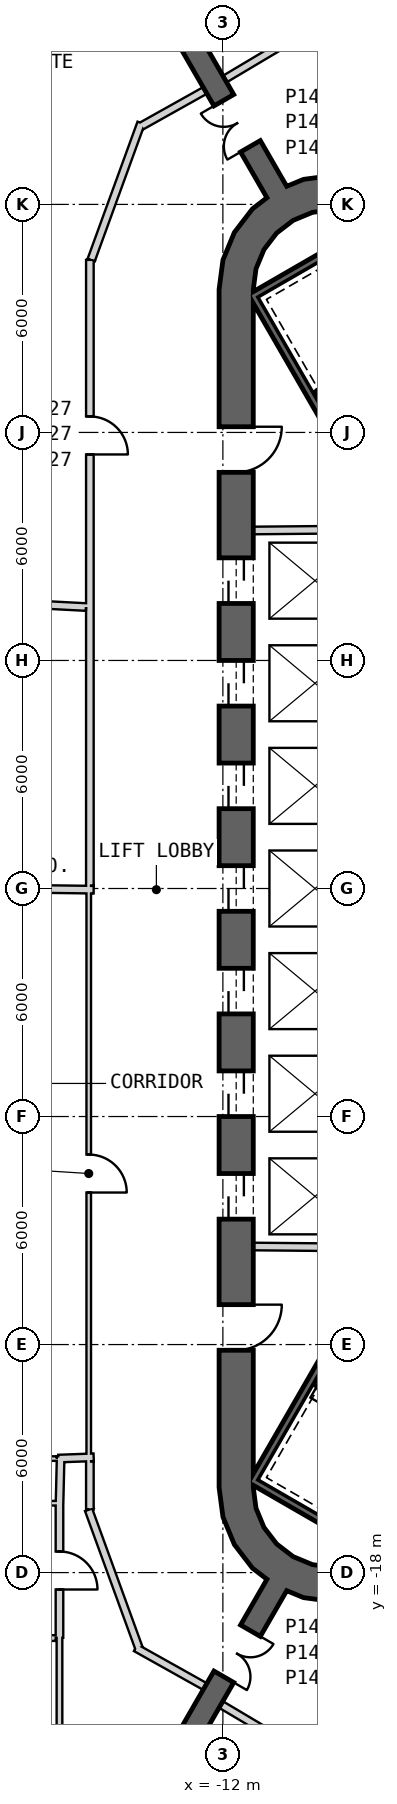
"""IFC4 building model, lengths in metres.
Left out: names, types, materials, properties, quantities, classifications, styles, units other than length and angle.
Written with IfcOpenShell. Run it as: python <this file> out.ifc"""

import sys

from ifc_helpers import new_model, si_unit, direction, frame, frame_2d, origin, place, context, subcontext, project, spatial, polyline, rectangle, outline, extrude, element, fill, save


model = new_model("IFC4")
c1 = context("Model", 3, precision=1e-05, world=origin(), true_north=direction((0.0, 1.0)))
c2 = subcontext(c1, "Body", "Model", "MODEL_VIEW")
j1 = project(units=[si_unit("LENGTHUNIT", "METRE"), si_unit("PLANEANGLEUNIT", "RADIAN")], contexts=[c1])
p1 = place(None, origin())
s1 = spatial("IfcSite", under=j1, at=p1, CompositionType="ELEMENT")
p2 = place(p1, origin())
s2 = spatial("IfcBuilding", under=s1, at=p2, CompositionType="ELEMENT")
p3 = place(p2, frame((0.0, 0.0, 310.4)))
s3 = spatial("IfcBuildingStorey", under=s2, at=p3, CompositionType="ELEMENT", Elevation=310.4)
p4 = place(p3, frame((-11.65, 15.762, 0.0), z_axis=(0.0, 0.0, 1.0), x_axis=(0.0, -1.0, 0.0)))
e1 = element("IfcWall", 1, at=p4, inside=s3, PredefinedType="SHEAR", context=c2, shape_type="SweptSolid", body=[
    extrude(rectangle(XDim=31.523, YDim=0.9, at=frame_2d((15.762, 0.0))), origin(), (0.0, 0.0, 1.0), 3.9),
])
p5 = place(p4, frame((7.062, 0.0, 0.0)))
e2 = element("IfcOpeningElement", 2, at=p5, cuts=e1, PredefinedType="OPENING", context=c2, shape_type="SweptSolid", body=[
    extrude(rectangle(XDim=1.2, YDim=2.4, at=frame_2d((0.6, 1.2))), frame((0.0, 0.46, 0.0), z_axis=(0.0, -1.0, 0.0), x_axis=(1.0, 0.0, 0.0)), (0.0, 0.0, 1.0), 0.92),
])
p6 = place(p4, frame((9.762, 0.0, 0.0)))
e3 = element("IfcOpeningElement", 3, at=p6, cuts=e1, PredefinedType="OPENING", context=c2, shape_type="SweptSolid", body=[
    extrude(rectangle(XDim=1.2, YDim=2.4, at=frame_2d((0.6, 1.2))), frame((0.0, 0.46, 0.0), z_axis=(0.0, -1.0, 0.0), x_axis=(1.0, 0.0, 0.0)), (0.0, 0.0, 1.0), 0.92),
])
p7 = place(p4, frame((12.462, 0.0, 0.0)))
e4 = element("IfcOpeningElement", 4, at=p7, cuts=e1, PredefinedType="OPENING", context=c2, shape_type="SweptSolid", body=[
    extrude(rectangle(XDim=1.2, YDim=2.4, at=frame_2d((0.6, 1.2))), frame((0.0, 0.46, 0.0), z_axis=(0.0, -1.0, 0.0), x_axis=(1.0, 0.0, 0.0)), (0.0, 0.0, 1.0), 0.92),
])
p8 = place(p4, frame((15.162, 0.0, 0.0)))
e5 = element("IfcOpeningElement", 5, at=p8, cuts=e1, PredefinedType="OPENING", context=c2, shape_type="SweptSolid", body=[
    extrude(rectangle(XDim=1.2, YDim=2.4, at=frame_2d((0.6, 1.2))), frame((0.0, 0.46, 0.0), z_axis=(0.0, -1.0, 0.0), x_axis=(1.0, 0.0, 0.0)), (0.0, 0.0, 1.0), 0.92),
])
p9 = place(p4, frame((17.862, 0.0, 0.0)))
e6 = element("IfcOpeningElement", 6, at=p9, cuts=e1, PredefinedType="OPENING", context=c2, shape_type="SweptSolid", body=[
    extrude(rectangle(XDim=1.2, YDim=2.4, at=frame_2d((0.6, 1.2))), frame((0.0, 0.46, 0.0), z_axis=(0.0, -1.0, 0.0), x_axis=(1.0, 0.0, 0.0)), (0.0, 0.0, 1.0), 0.92),
])
p10 = place(p4, frame((20.562, 0.0, 0.0)))
e7 = element("IfcOpeningElement", 7, at=p10, cuts=e1, PredefinedType="OPENING", context=c2, shape_type="SweptSolid", body=[
    extrude(rectangle(XDim=1.2, YDim=2.4, at=frame_2d((0.6, 1.2))), frame((0.0, 0.46, 0.0), z_axis=(0.0, -1.0, 0.0), x_axis=(1.0, 0.0, 0.0)), (0.0, 0.0, 1.0), 0.92),
])
p11 = place(p4, frame((23.262, 0.0, 0.0)))
e8 = element("IfcOpeningElement", 8, at=p11, cuts=e1, PredefinedType="OPENING", context=c2, shape_type="SweptSolid", body=[
    extrude(rectangle(XDim=1.2, YDim=2.4, at=frame_2d((0.6, 1.2))), frame((0.0, 0.46, 0.0), z_axis=(0.0, -1.0, 0.0), x_axis=(1.0, 0.0, 0.0)), (0.0, 0.0, 1.0), 0.92),
])
p12 = place(p4, frame((3.612, 0.0, 0.0)))
e9 = element("IfcOpeningElement", 9, at=p12, cuts=e1, PredefinedType="OPENING", context=c2, shape_type="SweptSolid", body=[
    extrude(rectangle(XDim=1.2, YDim=2.4, at=frame_2d((0.6, 1.2))), frame((0.0, 0.46, 0.0), z_axis=(0.0, -1.0, 0.0), x_axis=(1.0, 0.0, 0.0)), (0.0, 0.0, 1.0), 0.92),
])
p13 = place(p4, frame((26.712, 0.0, 0.0)))
e10 = element("IfcOpeningElement", 10, at=p13, cuts=e1, PredefinedType="OPENING", context=c2, shape_type="SweptSolid", body=[
    extrude(rectangle(XDim=1.2, YDim=2.4, at=frame_2d((0.6, 1.2))), frame((0.0, 0.46, 0.0), z_axis=(0.0, -1.0, 0.0), x_axis=(1.0, 0.0, 0.0)), (0.0, 0.0, 1.0), 0.92),
])
p14 = place(p3, origin())
e11 = element("IfcWall", 11, at=p14, inside=s3, PredefinedType="SHEAR", context=c2, shape_type="SweptSolid", body=[
    extrude(outline(polyline([(-7.6, 18.36), (-8.323, 18.659), (-9.1, 18.762), (-9.876, 18.659), (-10.6, 18.36), (-11.221, 17.883), (-11.698, 17.262), (-11.998, 16.538), (-12.1, 15.762), (-11.2, 15.762), (-11.128, 16.305), (-10.919, 16.812), (-10.585, 17.247), (-10.15, 17.58), (-9.644, 17.79), (-9.1, 17.862), (-8.556, 17.79), (-8.05, 17.58), (-7.6, 18.36)])), origin(), (0.0, 0.0, 1.0), 3.9),
])
p15 = place(p3, origin())
e12 = element("IfcWall", 12, at=p15, inside=s3, PredefinedType="SHEAR", context=c2, shape_type="SweptSolid", body=[
    extrude(outline(polyline([(-12.1, -15.762), (-11.998, -16.538), (-11.698, -17.262), (-11.221, -17.883), (-10.6, -18.36), (-9.876, -18.659), (-9.1, -18.762), (-8.323, -18.659), (-7.6, -18.36), (-8.05, -17.58), (-8.556, -17.79), (-9.1, -17.862), (-9.644, -17.79), (-10.15, -17.58), (-10.585, -17.247), (-10.919, -16.812), (-11.128, -16.305), (-11.2, -15.762), (-12.1, -15.762)])), origin(), (0.0, 0.0, 1.0), 3.9),
])
p16 = place(p3, frame((-10.575, 18.316, 0.0), z_axis=(0.0, 0.0, 1.0), x_axis=(-0.500009446655, 0.866019949687, 0.0)))
e13 = element("IfcWall", 13, at=p16, inside=s3, PredefinedType="SHEAR", context=c2, shape_type="SweptSolid", body=[
    extrude(rectangle(XDim=9.254, YDim=0.6, at=frame_2d((4.627, 0.0))), origin(), (0.0, 0.0, 1.0), 3.9),
])
p17 = place(p16, frame((1.4, 0.0, 0.0)))
e14 = element("IfcOpeningElement", 14, at=p17, cuts=e13, PredefinedType="OPENING", context=c2, shape_type="SweptSolid", body=[
    extrude(rectangle(XDim=1.4, YDim=2.4, at=frame_2d((0.7, 1.2))), frame((0.0, 0.31, 0.0), z_axis=(0.0, -1.0, 0.0), x_axis=(1.0, 0.0, 0.0)), (0.0, 0.0, 1.0), 0.62),
])
p18 = place(p3, frame((-10.575, -18.316, 0.0), z_axis=(0.0, 0.0, 1.0), x_axis=(-0.500009446655, -0.866019949687, 0.0)))
e15 = element("IfcWall", 15, at=p18, inside=s3, PredefinedType="SHEAR", context=c2, shape_type="SweptSolid", body=[
    extrude(rectangle(XDim=9.254, YDim=0.6, at=frame_2d((4.627, 0.0))), origin(), (0.0, 0.0, 1.0), 3.9),
])
p19 = place(p18, frame((1.4, 0.0, 0.0)))
e16 = element("IfcOpeningElement", 16, at=p19, cuts=e15, PredefinedType="OPENING", context=c2, shape_type="SweptSolid", body=[
    extrude(rectangle(XDim=1.4, YDim=2.4, at=frame_2d((0.7, 1.2))), frame((0.0, 0.31, 0.0), z_axis=(0.0, -1.0, 0.0), x_axis=(1.0, 0.0, 0.0)), (0.0, 0.0, 1.0), 0.62),
])
p20 = place(p3, frame((-11.2, 9.42, 0.0), z_axis=(0.0, 0.0, 1.0), x_axis=(0.999957167047, 0.009255488683, 0.0)))
e17 = element("IfcWall", 17, at=p20, inside=s3, PredefinedType="PLUMBINGWALL", context=c2, shape_type="SweptSolid", body=[
    extrude(rectangle(XDim=3.35, YDim=0.2, at=frame_2d((1.675, 0.0))), origin(), (0.0, 0.0, 1.0), 3.6),
])
p21 = place(p3, frame((-8.05, -9.449, 0.0), z_axis=(0.0, 0.0, 1.0), x_axis=(-0.999957467379, 0.009222983926, 0.0)))
e18 = element("IfcWall", 18, at=p21, inside=s3, PredefinedType="PLUMBINGWALL", context=c2, shape_type="SweptSolid", body=[
    extrude(rectangle(XDim=3.15, YDim=0.2, at=frame_2d((1.575, 0.0))), origin(), (0.0, 0.0, 1.0), 3.6),
])
p22 = place(p3, frame((-11.245, 15.678, -0.3), z_axis=(0.0, 0.0, 1.0), x_axis=(0.499977274689, -0.866038523851, 0.0)))
e19 = element("IfcWall", 19, at=p22, inside=s3, PredefinedType="SHEAR", context=c2, shape_type="SweptSolid", body=[
    extrude(rectangle(XDim=8.1, YDim=0.2, at=frame_2d((4.05, 0.0))), origin(), (0.0, 0.0, 1.0), 3.9),
])
for number, where, z_axis, x_axis in (
    (20, (-7.818, 17.541, -0.3), (0.0, 0.0, 1.0), (-0.866, -0.5, 0.0)),
    (21, (-11.282, -15.541, -0.3), (0.0, 0.0, 1.0), (0.866, -0.5, 0.0)),
):
    element("IfcWall", number, at=place(p3, frame(where, z_axis=z_axis, x_axis=x_axis)), inside=s3, PredefinedType="SHEAR", context=c2, shape_type="SweptSolid", body=[
        extrude(rectangle(XDim=3.8, YDim=0.2, at=frame_2d((1.9, 0.0))), origin(), (0.0, 0.0, 1.0), 3.9),
    ])
p23 = place(p3, frame((-7.196, -8.663, -0.3), z_axis=(0.0, 0.0, 1.0), x_axis=(-0.499997992926, -0.866026562566, 0.0)))
e22 = element("IfcWall", 22, at=p23, inside=s3, PredefinedType="SHEAR", context=c2, shape_type="SweptSolid", body=[
    extrude(rectangle(XDim=7.9, YDim=0.2, at=frame_2d((3.95, 0.0))), origin(), (0.0, 0.0, 1.0), 3.9),
])
p24 = place(p3, frame((-15.53, 0.0, 0.0), z_axis=(0.0, 0.0, 1.0), x_axis=(0.0, -1.0, 0.0)))
e23 = element("IfcWall", 23, at=p24, inside=s3, PredefinedType="PARTITIONING", context=c2, shape_type="SweptSolid", body=[
    extrude(rectangle(XDim=15.0, YDim=0.12, at=frame_2d((7.5, 0.0))), origin(), (0.0, 0.0, 1.0), 2.88),
])
p25 = place(p24, frame((7.0, 0.0, 0.0)))
e24 = element("IfcOpeningElement", 24, at=p25, cuts=e23, PredefinedType="OPENING", context=c2, shape_type="SweptSolid", body=[
    extrude(rectangle(XDim=1.0, YDim=2.1, at=frame_2d((0.5, 1.05))), frame((0.0, 0.07, 0.0), z_axis=(0.0, -1.0, 0.0), x_axis=(1.0, 0.0, 0.0)), (0.0, 0.0, 1.0), 0.14),
])
p26 = place(p3, frame((-16.33, -15.0, 0.0), z_axis=(0.0, 0.0, 1.0), x_axis=(0.999344339616, 0.036206227059, 0.0)))
e25 = element("IfcWall", 25, at=p26, inside=s3, PredefinedType="PARTITIONING", context=c2, shape_type="SweptSolid", body=[
    extrude(rectangle(XDim=0.93, YDim=0.2, at=frame_2d((0.465, 0.0))), origin(), (0.0, 0.0, 1.0), 3.6),
])
p27 = place(p3, frame((-15.4, -0.031, 0.0), z_axis=(0.0, 0.0, 1.0), x_axis=(-0.999914782125, 0.013054826261, 0.0)))
e26 = element("IfcWall", 26, at=p27, inside=s3, PredefinedType="PARTITIONING", context=c2, shape_type="SweptSolid", body=[
    extrude(rectangle(XDim=2.3, YDim=0.2, at=frame_2d((1.15, 0.0))), origin(), (0.0, 0.0, 1.0), 3.6),
])
p28 = place(p3, frame((-17.74, -15.0, 0.0), z_axis=(0.0, 0.0, 1.0), x_axis=(1.0, 0.0, 0.0)))
e27 = element("IfcWall", 27, at=p28, inside=s3, PredefinedType="PARTITIONING", context=c2, shape_type="SweptSolid", body=[
    extrude(rectangle(XDim=1.37, YDim=0.12, at=frame_2d((0.685, 0.0))), origin(), (0.0, 0.0, 1.0), 3.6),
])
p29 = place(p3, frame((-14.293, -19.978, 0.0), z_axis=(0.0, 0.0, 1.0), x_axis=(0.872510000486, -0.48859625362, 0.0)))
e28 = element("IfcWall", 28, at=p29, inside=s3, PredefinedType="PARTITIONING", context=c2, shape_type="SweptSolid", body=[
    extrude(rectangle(XDim=2.09, YDim=0.2, at=frame_2d((1.045, 0.0))), origin(), (0.0, 0.0, 1.0), 3.6),
])
p30 = place(p3, frame((-15.534, -16.346, 0.0), z_axis=(0.0, 0.0, 1.0), x_axis=(0.342001008711, -0.939699584996, 0.0)))
e29 = element("IfcWall", 29, at=p30, inside=s3, PredefinedType="PARTITIONING", context=c2, shape_type="SweptSolid", body=[
    extrude(rectangle(XDim=3.875, YDim=0.2, at=frame_2d((1.938, 0.0))), origin(), (0.0, 0.0, 1.0), 2.88),
])
p31 = place(p3, frame((-15.5, 16.541, 0.0), z_axis=(0.0, 0.0, 1.0), x_axis=(0.0, -1.0, 0.0)))
e30 = element("IfcWall", 30, at=p31, inside=s3, PredefinedType="PARTITIONING", context=c2, shape_type="SweptSolid", body=[
    extrude(rectangle(XDim=9.163, YDim=0.2, at=frame_2d((4.581, 0.0))), origin(), (0.0, 0.0, 1.0), 2.88),
])
p32 = place(p31, frame((4.12, 0.0, 0.0)))
e31 = element("IfcOpeningElement", 31, at=p32, cuts=e30, PredefinedType="OPENING", context=c2, shape_type="SweptSolid", body=[
    extrude(rectangle(XDim=1.0, YDim=2.1, at=frame_2d((0.5, 1.05))), frame((0.0, 0.11, 0.0), z_axis=(0.0, -1.0, 0.0), x_axis=(1.0, 0.0, 0.0)), (0.0, 0.0, 1.0), 0.22),
])
p33 = place(p3, frame((-15.5, 7.378, 0.0), z_axis=(0.0, 0.0, 1.0), x_axis=(0.0, -1.0, 0.0)))
e32 = element("IfcWall", 32, at=p33, inside=s3, PredefinedType="PARTITIONING", context=c2, shape_type="SweptSolid", body=[
    extrude(rectangle(XDim=7.308, YDim=0.2, at=frame_2d((3.654, 0.0))), origin(), (0.0, 0.0, 1.0), 2.97),
])
p34 = place(p3, frame((-15.5, -15.07, 0.0), z_axis=(0.0, 0.0, 1.0), x_axis=(0.0, -1.0, 0.0)))
e33 = element("IfcWall", 33, at=p34, inside=s3, PredefinedType="PARTITIONING", context=c2, shape_type="SweptSolid", body=[
    extrude(rectangle(XDim=1.271, YDim=0.2, at=frame_2d((0.635, 0.0))), origin(), (0.0, 0.0, 1.0), 3.6),
])
p35 = place(p3, frame((-14.152, 20.143, 0.0), z_axis=(0.0, 0.0, 1.0), x_axis=(-0.342008467257, -0.939696870445, 0.0)))
e34 = element("IfcWall", 34, at=p35, inside=s3, PredefinedType="PARTITIONING", context=c2, shape_type="SweptSolid", body=[
    extrude(rectangle(XDim=3.841, YDim=0.2, at=frame_2d((1.92, 0.0))), origin(), (0.0, 0.0, 1.0), 2.88),
])
p36 = place(p3, frame((-12.47, 20.999, 0.0), z_axis=(0.0, 0.0, 1.0), x_axis=(-0.872542788959, -0.488537697046, 0.0)))
e35 = element("IfcWall", 35, at=p36, inside=s3, PredefinedType="PARTITIONING", context=c2, shape_type="SweptSolid", body=[
    extrude(rectangle(XDim=1.925, YDim=0.2, at=frame_2d((0.962, 0.0))), origin(), (0.0, 0.0, 1.0), 3.6),
])
p37 = place(p3, frame((-10.155, 22.367, 0.0), z_axis=(0.0, 0.0, 1.0), x_axis=(-0.859343009577, -0.511399640097, 0.0)))
e36 = element("IfcWall", 36, at=p37, inside=s3, PredefinedType="PARTITIONING", context=c2, shape_type="SweptSolid", body=[
    extrude(rectangle(XDim=2.09, YDim=0.2, at=frame_2d((1.045, 0.0))), origin(), (0.0, 0.0, 1.0), 3.6),
])
p38 = place(p3, frame((-6.389, 21.626, 0.0), z_axis=(0.0, 0.0, 1.0), x_axis=(-0.984802578286, 0.173677522442, 0.0)))
e37 = element("IfcWall", 37, at=p38, inside=s3, PredefinedType="PARTITIONING", context=c2, shape_type="SweptSolid", body=[
    extrude(rectangle(XDim=3.875, YDim=0.2, at=frame_2d((1.938, 0.0))), origin(), (0.0, 0.0, 1.0), 2.88),
])
p39 = place(p3, frame((-10.406, -22.538, 0.0), z_axis=(0.0, 0.0, 1.0), x_axis=(0.98480284819, 0.173675991999, 0.0)))
e38 = element("IfcWall", 38, at=p39, inside=s3, PredefinedType="PARTITIONING", context=c2, shape_type="SweptSolid", body=[
    extrude(rectangle(XDim=3.949, YDim=0.2, at=frame_2d((1.974, 0.0))), origin(), (0.0, 0.0, 1.0), 2.88),
])
p40 = place(p3, frame((-12.05, -21.472, 0.0), z_axis=(0.0, 0.0, 1.0), x_axis=(0.859577966481, -0.511004617924, 0.0)))
e39 = element("IfcWall", 39, at=p40, inside=s3, PredefinedType="PARTITIONING", context=c2, shape_type="SweptSolid", body=[
    extrude(rectangle(XDim=1.998, YDim=0.2, at=frame_2d((0.999, 0.0))), origin(), (0.0, 0.0, 1.0), 3.6),
])
p41 = place(p3, frame((-16.269, -14.94, 0.0), z_axis=(0.0, 0.0, 1.0), x_axis=(-0.024314076851, -0.999704369135, 0.0)))
e40 = element("IfcWall", 40, at=p41, inside=s3, PredefinedType="PARTITIONING", context=c2, shape_type="SweptSolid", body=[
    extrude(rectangle(XDim=1.295, YDim=0.2, at=frame_2d((0.648, 0.0))), origin(), (0.0, 0.0, 1.0), 3.6),
])
p42 = place(p3, frame((-16.3, -16.115, 0.0), z_axis=(0.0, 0.0, 1.0), x_axis=(0.0, -1.0, 0.0)))
e41 = element("IfcWall", 41, at=p42, inside=s3, PredefinedType="PARTITIONING", context=c2, shape_type="SweptSolid", body=[
    extrude(rectangle(XDim=3.6, YDim=0.2, at=frame_2d((1.8, 0.0))), origin(), (0.0, 0.0, 1.0), 2.88),
])
p43 = place(p42, frame((1.33, 0.0, 0.0)))
e42 = element("IfcOpeningElement", 42, at=p43, cuts=e41, PredefinedType="OPENING", context=c2, shape_type="SweptSolid", body=[
    extrude(rectangle(XDim=1.0, YDim=2.1, at=frame_2d((0.5, 1.05))), frame((0.0, 0.11, 0.0), z_axis=(0.0, -1.0, 0.0), x_axis=(1.0, 0.0, 0.0)), (0.0, 0.0, 1.0), 0.22),
])
p44 = place(p3, frame((-16.3, -19.715, 0.0), z_axis=(0.0, 0.0, 1.0), x_axis=(0.0, -1.0, 0.0)))
e43 = element("IfcWall", 43, at=p44, inside=s3, PredefinedType="PLUMBINGWALL", context=c2, shape_type="SweptSolid", body=[
    extrude(rectangle(XDim=3.34, YDim=0.15, at=frame_2d((1.67, 0.0))), origin(), (0.0, 0.0, 1.0), 3.6),
])
p45 = place(p3, frame((-24.326, 7.86, 0.0), z_axis=(0.0, 0.0, 1.0), x_axis=(0.998647308215, -0.051995709386, 0.0)))
e44 = element("IfcWall", 44, at=p45, inside=s3, PredefinedType="PARTITIONING", context=c2, shape_type="SweptSolid", body=[
    extrude(rectangle(XDim=8.738, YDim=0.2, at=frame_2d((4.369, 0.0))), origin(), (0.0, 0.0, 1.0), 2.97),
])
p46 = place(p3, frame((-16.4, -16.175, 0.0), z_axis=(0.0, 0.0, 1.0), x_axis=(-1.0, 0.0, 0.0)))
e45 = element("IfcWall", 45, at=p46, inside=s3, PredefinedType="PARTITIONING", context=c2, shape_type="SweptSolid", body=[
    extrude(rectangle(XDim=5.39, YDim=0.12, at=frame_2d((2.695, 0.0))), origin(), (0.0, 0.0, 1.0), 3.6),
])
p47 = place(p3, frame((-21.79, -19.723, 0.0), z_axis=(0.0, 0.0, 1.0), x_axis=(1.0, 0.0, 0.0)))
e46 = element("IfcWall", 46, at=p47, inside=s3, PredefinedType="PLUMBINGWALL", context=c2, shape_type="SweptSolid", body=[
    extrude(rectangle(XDim=5.39, YDim=0.15, at=frame_2d((2.695, 0.0))), origin(), (0.0, 0.0, 1.0), 2.88),
])
p48 = place(p25, origin())
e47 = element("IfcDoor", 47, at=p48, inside=s3, OperationType="SINGLE_SWING_LEFT", PredefinedType="NOTDEFINED", context=c2, shape_type="SweptSolid", body=[
    extrude(rectangle(XDim=1.0, YDim=2.1, at=frame_2d((0.5, 1.05))), frame((0.0, 0.025, 0.0), z_axis=(0.0, -1.0, 0.0), x_axis=(1.0, 0.0, 0.0)), (0.0, 0.0, 1.0), 0.05),
])
fill(e24, e47)
p49 = place(p43, origin())
e48 = element("IfcDoor", 48, at=p49, inside=s3, OperationType="SINGLE_SWING_LEFT", PredefinedType="USERDEFINED", context=c2, shape_type="SweptSolid", body=[
    extrude(rectangle(XDim=1.0, YDim=2.1, at=frame_2d((0.5, 1.05))), frame((0.0, 0.025, 0.0), z_axis=(0.0, -1.0, 0.0), x_axis=(1.0, 0.0, 0.0)), (0.0, 0.0, 1.0), 0.05),
])
fill(e42, e48)
p50 = place(p32, origin())
e49 = element("IfcDoor", 49, at=p50, inside=s3, OperationType="SINGLE_SWING_LEFT", PredefinedType="USERDEFINED", context=c2, shape_type="SweptSolid", body=[
    extrude(rectangle(XDim=1.0, YDim=2.1, at=frame_2d((0.5, 1.05))), frame((0.0, 0.025, 0.0), z_axis=(0.0, -1.0, 0.0), x_axis=(1.0, 0.0, 0.0)), (0.0, 0.0, 1.0), 0.05),
])
fill(e31, e49)
p51 = place(p5, origin())
e50 = element("IfcDoor", 50, at=p51, inside=s3, OperationType="SLIDING_TO_LEFT", PredefinedType="USERDEFINED", context=c2, shape_type="SweptSolid", body=[
    extrude(rectangle(XDim=1.2, YDim=2.4, at=frame_2d((0.6, 1.2))), frame((0.0, 0.025, 0.0), z_axis=(0.0, -1.0, 0.0), x_axis=(1.0, 0.0, 0.0)), (0.0, 0.0, 1.0), 0.05),
])
fill(e2, e50)
p52 = place(p6, origin())
e51 = element("IfcDoor", 51, at=p52, inside=s3, OperationType="SLIDING_TO_LEFT", PredefinedType="USERDEFINED", context=c2, shape_type="SweptSolid", body=[
    extrude(rectangle(XDim=1.2, YDim=2.4, at=frame_2d((0.6, 1.2))), frame((0.0, 0.025, 0.0), z_axis=(0.0, -1.0, 0.0), x_axis=(1.0, 0.0, 0.0)), (0.0, 0.0, 1.0), 0.05),
])
fill(e3, e51)
p53 = place(p7, origin())
e52 = element("IfcDoor", 52, at=p53, inside=s3, OperationType="SLIDING_TO_LEFT", PredefinedType="USERDEFINED", context=c2, shape_type="SweptSolid", body=[
    extrude(rectangle(XDim=1.2, YDim=2.4, at=frame_2d((0.6, 1.2))), frame((0.0, 0.025, 0.0), z_axis=(0.0, -1.0, 0.0), x_axis=(1.0, 0.0, 0.0)), (0.0, 0.0, 1.0), 0.05),
])
fill(e4, e52)
p54 = place(p8, origin())
e53 = element("IfcDoor", 53, at=p54, inside=s3, OperationType="SLIDING_TO_LEFT", PredefinedType="USERDEFINED", context=c2, shape_type="SweptSolid", body=[
    extrude(rectangle(XDim=1.2, YDim=2.4, at=frame_2d((0.6, 1.2))), frame((0.0, 0.025, 0.0), z_axis=(0.0, -1.0, 0.0), x_axis=(1.0, 0.0, 0.0)), (0.0, 0.0, 1.0), 0.05),
])
fill(e5, e53)
p55 = place(p9, origin())
e54 = element("IfcDoor", 54, at=p55, inside=s3, OperationType="SLIDING_TO_LEFT", PredefinedType="USERDEFINED", context=c2, shape_type="SweptSolid", body=[
    extrude(rectangle(XDim=1.2, YDim=2.4, at=frame_2d((0.6, 1.2))), frame((0.0, 0.025, 0.0), z_axis=(0.0, -1.0, 0.0), x_axis=(1.0, 0.0, 0.0)), (0.0, 0.0, 1.0), 0.05),
])
fill(e6, e54)
p56 = place(p10, origin())
e55 = element("IfcDoor", 55, at=p56, inside=s3, OperationType="SLIDING_TO_LEFT", PredefinedType="USERDEFINED", context=c2, shape_type="SweptSolid", body=[
    extrude(rectangle(XDim=1.2, YDim=2.4, at=frame_2d((0.6, 1.2))), frame((0.0, 0.025, 0.0), z_axis=(0.0, -1.0, 0.0), x_axis=(1.0, 0.0, 0.0)), (0.0, 0.0, 1.0), 0.05),
])
fill(e7, e55)
p57 = place(p11, origin())
e56 = element("IfcDoor", 56, at=p57, inside=s3, OperationType="SLIDING_TO_LEFT", PredefinedType="USERDEFINED", context=c2, shape_type="SweptSolid", body=[
    extrude(rectangle(XDim=1.2, YDim=2.4, at=frame_2d((0.6, 1.2))), frame((0.0, 0.025, 0.0), z_axis=(0.0, -1.0, 0.0), x_axis=(1.0, 0.0, 0.0)), (0.0, 0.0, 1.0), 0.05),
])
fill(e8, e56)
p58 = place(p12, origin())
e57 = element("IfcDoor", 57, at=p58, inside=s3, OperationType="SINGLE_SWING_LEFT", PredefinedType="USERDEFINED", context=c2, shape_type="SweptSolid", body=[
    extrude(rectangle(XDim=1.2, YDim=2.4, at=frame_2d((0.6, 1.2))), frame((0.0, 0.025, 0.0), z_axis=(0.0, -1.0, 0.0), x_axis=(1.0, 0.0, 0.0)), (0.0, 0.0, 1.0), 0.05),
])
fill(e9, e57)
p59 = place(p13, origin())
e58 = element("IfcDoor", 58, at=p59, inside=s3, OperationType="SINGLE_SWING_RIGHT", PredefinedType="USERDEFINED", context=c2, shape_type="SweptSolid", body=[
    extrude(rectangle(XDim=1.2, YDim=2.4, at=frame_2d((0.6, 1.2))), frame((0.0, 0.025, 0.0), z_axis=(0.0, -1.0, 0.0), x_axis=(1.0, 0.0, 0.0)), (0.0, 0.0, 1.0), 0.05),
])
fill(e10, e58)
p60 = place(p17, origin())
e59 = element("IfcDoor", 59, at=p60, inside=s3, OperationType="DOUBLE_DOOR_SINGLE_SWING", PredefinedType="NOTDEFINED", context=c2, shape_type="SweptSolid", body=[
    extrude(rectangle(XDim=1.4, YDim=2.4, at=frame_2d((0.7, 1.2))), frame((0.0, 0.025, 0.0), z_axis=(0.0, -1.0, 0.0), x_axis=(1.0, 0.0, 0.0)), (0.0, 0.0, 1.0), 0.05),
])
fill(e14, e59)
p61 = place(p19, origin())
e60 = element("IfcDoor", 60, at=p61, inside=s3, OperationType="DOUBLE_DOOR_SINGLE_SWING", PredefinedType="NOTDEFINED", context=c2, shape_type="SweptSolid", body=[
    extrude(rectangle(XDim=1.4, YDim=2.4, at=frame_2d((0.7, 1.2))), frame((0.0, 0.025, 0.0), z_axis=(0.0, -1.0, 0.0), x_axis=(1.0, 0.0, 0.0)), (0.0, 0.0, 1.0), 0.05),
])
fill(e16, e60)
save(model, sys.argv[1])
